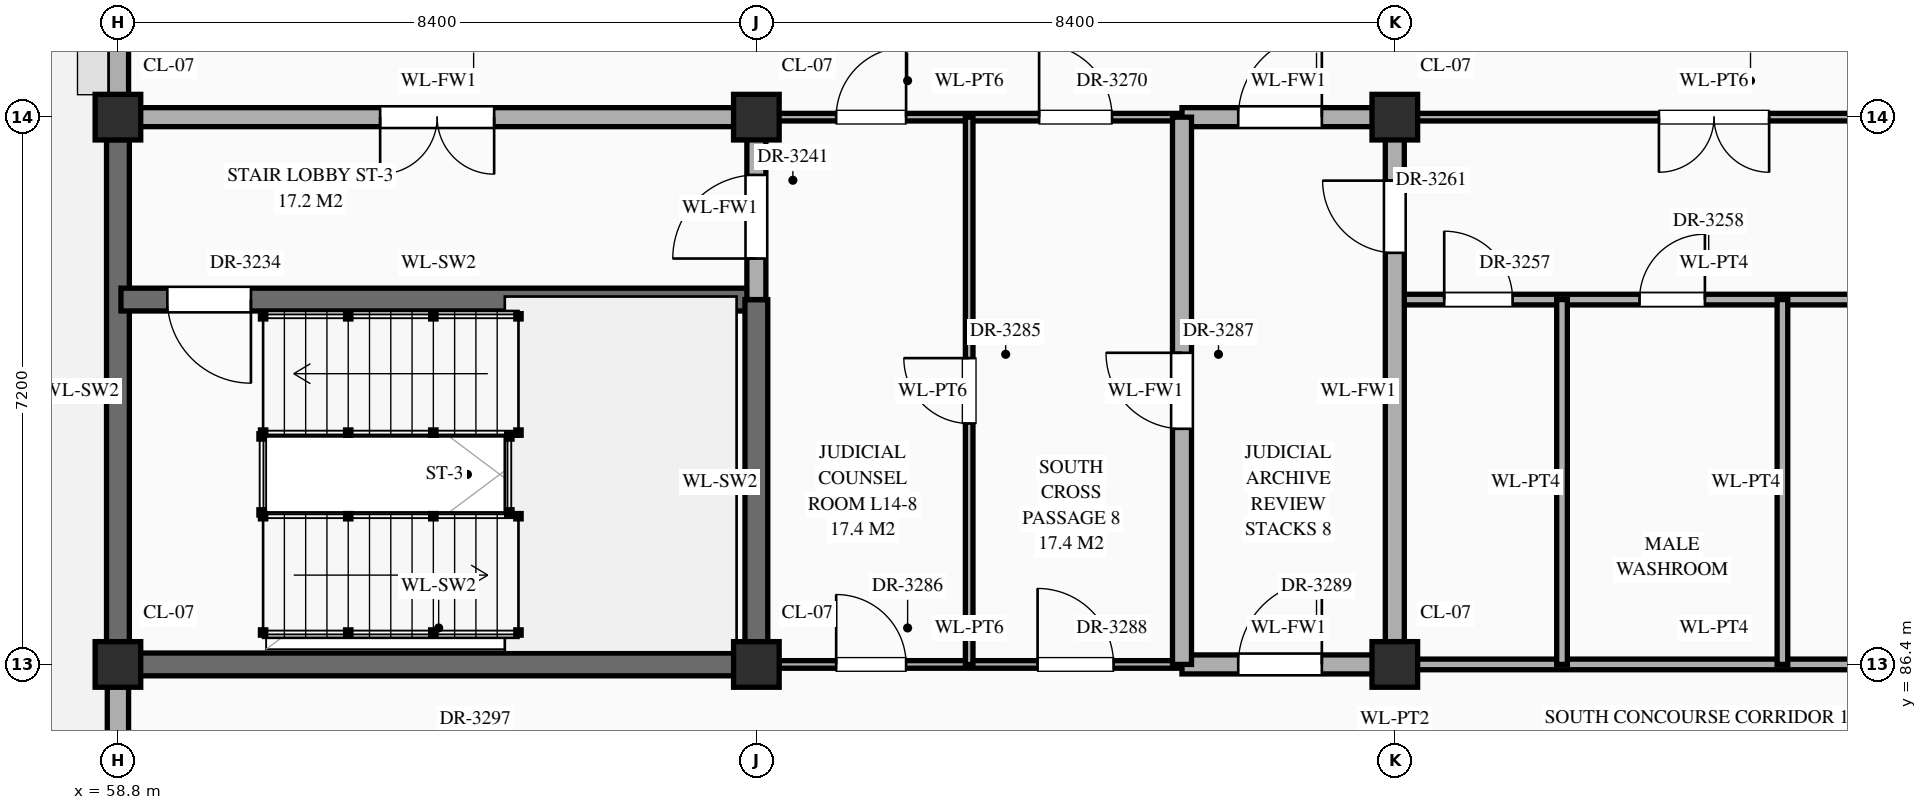
"""IFC4 building model, lengths in metres.
Left out: names, types, materials, properties, quantities, classifications, styles, units other than length and angle.
Written with IfcOpenShell. Run it as: python <this file> out.ifc"""

import sys

from ifc_helpers import new_model, si_unit, direction, frame, frame_2d, origin, origin_2d, place, context, subcontext, project, spatial, rectangle, extrude, element, fill, save


model = new_model("IFC4")
c1 = context("Model", 3, precision=1e-05, world=origin(), true_north=direction((0.0, 1.0)))
c2 = subcontext(c1, "Body", "Model", "MODEL_VIEW")
j1 = project(units=[si_unit("LENGTHUNIT", "METRE"), si_unit("PLANEANGLEUNIT", "RADIAN")], contexts=[c1])
p1 = place(None, origin())
s1 = spatial("IfcSite", under=j1, at=p1, CompositionType="ELEMENT")
p2 = place(p1, origin())
s2 = spatial("IfcBuilding", under=s1, at=p2, CompositionType="ELEMENT")
p3 = place(p2, frame((0.0, 0.0, 60.3)))
s3 = spatial("IfcBuildingStorey", under=s2, at=p3, CompositionType="ELEMENT", Elevation=60.3)
for number, where, z_axis, x_axis in (
    (1, (58.8, 86.4, 0.0), (0.0, 0.0, 1.0), (1.0, 0.0, 0.0)),
    (2, (58.8, 93.6, 0.0), (0.0, 0.0, 1.0), (1.0, 0.0, 0.0)),
    (3, (67.2, 86.4, 0.0), (0.0, 0.0, 1.0), (1.0, 0.0, 0.0)),
    (4, (67.2, 93.6, 0.0), (0.0, 0.0, 1.0), (1.0, 0.0, 0.0)),
    (5, (75.6, 86.4, 0.0), (0.0, 0.0, 1.0), (1.0, 0.0, 0.0)),
    (6, (75.6, 93.6, 0.0), (0.0, 0.0, 1.0), (1.0, 0.0, 0.0)),
):
    element("IfcColumn", number, at=place(p3, frame(where, z_axis=z_axis, x_axis=x_axis)), inside=s3, PredefinedType="COLUMN", context=c2, shape_type="SweptSolid", body=[
        extrude(rectangle(XDim=0.6, YDim=0.6, at=origin_2d()), origin(), (0.0, 0.0, 1.0), 4.2),
    ])
p4 = place(p3, frame((58.8, 79.495, 0.0), z_axis=(0.0, 0.0, 1.0), x_axis=(0.0, 1.0, 0.0)))
e7 = element("IfcWall", 7, at=p4, inside=s3, PredefinedType="STANDARD", context=c2, shape_type="SweptSolid", body=[
    extrude(rectangle(XDim=6.61, YDim=0.28, at=frame_2d((3.305, 0.0))), origin(), (0.0, 0.0, 1.0), 3.31),
])
p5 = place(p4, frame((1.205, 0.0, 0.0)))
e8 = element("IfcOpeningElement", 8, at=p5, cuts=e7, PredefinedType="OPENING", context=c2, shape_type="SweptSolid", body=[
    extrude(rectangle(XDim=1.8, YDim=2.25, at=frame_2d((0.9, 1.125))), frame((0.0, 0.152, 0.0), z_axis=(0.0, -1.0, 0.0), x_axis=(1.0, 0.0, 0.0)), (0.0, 0.0, 1.0), 0.304),
])
p6 = place(p3, frame((58.8, 86.695, 0.0), z_axis=(0.0, 0.0, 1.0), x_axis=(0.0, 1.0, 0.0)))
e9 = element("IfcWall", 9, at=p6, inside=s3, PredefinedType="SHEAR", context=c2, shape_type="SweptSolid", body=[
    extrude(rectangle(XDim=6.61, YDim=0.3, at=frame_2d((3.305, 0.0))), origin(), (0.0, 0.0, 1.0), 3.96),
])
p7 = place(p3, frame((58.8, 93.895, 0.0), z_axis=(0.0, 0.0, 1.0), x_axis=(0.0, 1.0, 0.0)))
e10 = element("IfcWall", 10, at=p7, inside=s3, PredefinedType="STANDARD", context=c2, shape_type="SweptSolid", body=[
    extrude(rectangle(XDim=6.61, YDim=0.28, at=frame_2d((3.305, 0.0))), origin(), (0.0, 0.0, 1.0), 3.31),
])
p8 = place(p7, frame((4.155, 0.0, 0.85)))
e11 = element("IfcOpeningElement", 11, at=p8, cuts=e10, PredefinedType="OPENING", context=c2, shape_type="SweptSolid", body=[
    extrude(rectangle(XDim=0.9, YDim=1.92, at=frame_2d((0.45, 0.96))), frame((0.0, 0.152, 0.0), z_axis=(0.0, -1.0, 0.0), x_axis=(1.0, 0.0, 0.0)), (0.0, 0.0, 1.0), 0.304),
])
p9 = place(p3, frame((58.84, 86.4, 0.0), z_axis=(0.0, 0.0, 1.0), x_axis=(1.0, 0.0, 0.0)))
e12 = element("IfcWall", 12, at=p9, inside=s3, PredefinedType="SHEAR", context=c2, shape_type="SweptSolid", body=[
    extrude(rectangle(XDim=8.36, YDim=0.3, at=frame_2d((4.18, 0.0))), origin(), (0.0, 0.0, 1.0), 3.96),
])
p10 = place(p3, frame((67.2, 86.4, 0.0), z_axis=(0.0, 0.0, 1.0), x_axis=(1.0, 0.0, 0.0)))
e13 = element("IfcWall", 13, at=p10, inside=s3, PredefinedType="STANDARD", context=c2, shape_type="SweptSolid", body=[
    extrude(rectangle(XDim=5.6, YDim=0.1, at=frame_2d((2.8, 0.0))), origin(), (0.0, 0.0, 1.0), 3.11),
])
p11 = place(p10, frame((1.05, 0.0, 0.0)))
e14 = element("IfcOpeningElement", 14, at=p11, cuts=e13, PredefinedType="OPENING", context=c2, shape_type="SweptSolid", body=[
    extrude(rectangle(XDim=0.92, YDim=2.15, at=frame_2d((0.46, 1.075))), frame((0.0, 0.062, 0.0), z_axis=(0.0, -1.0, 0.0), x_axis=(1.0, 0.0, 0.0)), (0.0, 0.0, 1.0), 0.124),
])
p12 = place(p10, frame((3.7, 0.0, 0.0)))
e15 = element("IfcOpeningElement", 15, at=p12, cuts=e13, PredefinedType="OPENING", context=c2, shape_type="SweptSolid", body=[
    extrude(rectangle(XDim=1.0, YDim=2.25, at=frame_2d((0.5, 1.125))), frame((0.0, 0.062, 0.0), z_axis=(0.0, -1.0, 0.0), x_axis=(1.0, 0.0, 0.0)), (0.0, 0.0, 1.0), 0.124),
])
p13 = place(p3, frame((72.8, 86.4, 0.0), z_axis=(0.0, 0.0, 1.0), x_axis=(1.0, 0.0, 0.0)))
e16 = element("IfcWall", 16, at=p13, inside=s3, PredefinedType="STANDARD", context=c2, shape_type="SweptSolid", body=[
    extrude(rectangle(XDim=2.8, YDim=0.25, at=frame_2d((1.4, 0.0))), origin(), (0.0, 0.0, 1.0), 3.11),
])
p14 = place(p13, frame((0.74, 0.0, 0.0)))
e17 = element("IfcOpeningElement", 17, at=p14, cuts=e16, PredefinedType="OPENING", context=c2, shape_type="SweptSolid", body=[
    extrude(rectangle(XDim=1.1, YDim=2.2, at=frame_2d((0.55, 1.1))), frame((0.0, 0.137, 0.0), z_axis=(0.0, -1.0, 0.0), x_axis=(1.0, 0.0, 0.0)), (0.0, 0.0, 1.0), 0.274),
])
p15 = place(p3, frame((75.6, 86.4, 0.0), z_axis=(0.0, 0.0, 1.0), x_axis=(1.0, 0.0, 0.0)))
e18 = element("IfcWall", 18, at=p15, inside=s3, PredefinedType="STANDARD", context=c2, shape_type="SweptSolid", body=[
    extrude(rectangle(XDim=8.4, YDim=0.14, at=frame_2d((4.2, 0.0))), origin(), (0.0, 0.0, 1.0), 3.11),
])
p16 = place(p3, frame((58.84, 91.2, 0.0), z_axis=(0.0, 0.0, 1.0), x_axis=(1.0, 0.0, 0.0)))
e19 = element("IfcWall", 19, at=p16, inside=s3, PredefinedType="SHEAR", context=c2, shape_type="SweptSolid", body=[
    extrude(rectangle(XDim=8.36, YDim=0.3, at=frame_2d((4.18, 0.0))), origin(), (0.0, 0.0, 1.0), 3.96),
])
p17 = place(p16, frame((0.61, 0.0, 0.0)))
e20 = element("IfcOpeningElement", 20, at=p17, cuts=e19, PredefinedType="OPENING", context=c2, shape_type="SweptSolid", body=[
    extrude(rectangle(XDim=1.1, YDim=2.2, at=frame_2d((0.55, 1.1))), frame((0.0, 0.162, 0.0), z_axis=(0.0, -1.0, 0.0), x_axis=(1.0, 0.0, 0.0)), (0.0, 0.0, 1.0), 0.324),
])
p18 = place(p3, frame((75.6, 91.2, 0.0), z_axis=(0.0, 0.0, 1.0), x_axis=(1.0, 0.0, 0.0)))
e21 = element("IfcWall", 21, at=p18, inside=s3, PredefinedType="STANDARD", context=c2, shape_type="SweptSolid", body=[
    extrude(rectangle(XDim=8.4, YDim=0.14, at=frame_2d((4.2, 0.0))), origin(), (0.0, 0.0, 1.0), 3.96),
])
p19 = place(p18, frame((0.65, 0.0, 0.0)))
e22 = element("IfcOpeningElement", 22, at=p19, cuts=e21, PredefinedType="OPENING", context=c2, shape_type="SweptSolid", body=[
    extrude(rectangle(XDim=0.9, YDim=2.15, at=frame_2d((0.45, 1.075))), frame((0.0, 0.082, 0.0), z_axis=(0.0, -1.0, 0.0), x_axis=(1.0, 0.0, 0.0)), (0.0, 0.0, 1.0), 0.164),
])
p20 = place(p18, frame((3.22, 0.0, 0.0)))
e23 = element("IfcOpeningElement", 23, at=p20, cuts=e21, PredefinedType="OPENING", context=c2, shape_type="SweptSolid", body=[
    extrude(rectangle(XDim=0.86, YDim=2.1, at=frame_2d((0.43, 1.05))), frame((0.0, 0.082, 0.0), z_axis=(0.0, -1.0, 0.0), x_axis=(1.0, 0.0, 0.0)), (0.0, 0.0, 1.0), 0.164),
])
p21 = place(p18, frame((6.32, 0.0, 0.0)))
e24 = element("IfcOpeningElement", 24, at=p21, cuts=e21, PredefinedType="OPENING", context=c2, shape_type="SweptSolid", body=[
    extrude(rectangle(XDim=0.86, YDim=2.1, at=frame_2d((0.43, 1.05))), frame((0.0, 0.082, 0.0), z_axis=(0.0, -1.0, 0.0), x_axis=(1.0, 0.0, 0.0)), (0.0, 0.0, 1.0), 0.164),
])
p22 = place(p3, frame((58.84, 93.6, 0.0), z_axis=(0.0, 0.0, 1.0), x_axis=(1.0, 0.0, 0.0)))
e25 = element("IfcWall", 25, at=p22, inside=s3, PredefinedType="STANDARD", context=c2, shape_type="SweptSolid", body=[
    extrude(rectangle(XDim=8.36, YDim=0.25, at=frame_2d((4.18, 0.0))), origin(), (0.0, 0.0, 1.0), 3.11),
])
p23 = place(p22, frame((3.41, 0.0, 0.0)))
e26 = element("IfcOpeningElement", 26, at=p23, cuts=e25, PredefinedType="OPENING", context=c2, shape_type="SweptSolid", body=[
    extrude(rectangle(XDim=1.5, YDim=2.25, at=frame_2d((0.75, 1.125))), frame((0.0, 0.137, 0.0), z_axis=(0.0, -1.0, 0.0), x_axis=(1.0, 0.0, 0.0)), (0.0, 0.0, 1.0), 0.274),
])
p24 = place(p3, frame((67.2, 93.6, 0.0), z_axis=(0.0, 0.0, 1.0), x_axis=(1.0, 0.0, 0.0)))
e27 = element("IfcWall", 27, at=p24, inside=s3, PredefinedType="STANDARD", context=c2, shape_type="SweptSolid", body=[
    extrude(rectangle(XDim=5.6, YDim=0.1, at=frame_2d((2.8, 0.0))), origin(), (0.0, 0.0, 1.0), 3.11),
])
p25 = place(p24, frame((1.05, 0.0, 0.0)))
e28 = element("IfcOpeningElement", 28, at=p25, cuts=e27, PredefinedType="OPENING", context=c2, shape_type="SweptSolid", body=[
    extrude(rectangle(XDim=0.92, YDim=2.15, at=frame_2d((0.46, 1.075))), frame((0.0, 0.062, 0.0), z_axis=(0.0, -1.0, 0.0), x_axis=(1.0, 0.0, 0.0)), (0.0, 0.0, 1.0), 0.124),
])
p26 = place(p24, frame((3.72, 0.0, 0.0)))
e29 = element("IfcOpeningElement", 29, at=p26, cuts=e27, PredefinedType="OPENING", context=c2, shape_type="SweptSolid", body=[
    extrude(rectangle(XDim=0.96, YDim=2.2, at=frame_2d((0.48, 1.1))), frame((0.0, 0.062, 0.0), z_axis=(0.0, -1.0, 0.0), x_axis=(1.0, 0.0, 0.0)), (0.0, 0.0, 1.0), 0.124),
])
p27 = place(p3, frame((72.8, 93.6, 0.0), z_axis=(0.0, 0.0, 1.0), x_axis=(1.0, 0.0, 0.0)))
e30 = element("IfcWall", 30, at=p27, inside=s3, PredefinedType="STANDARD", context=c2, shape_type="SweptSolid", body=[
    extrude(rectangle(XDim=2.8, YDim=0.25, at=frame_2d((1.4, 0.0))), origin(), (0.0, 0.0, 1.0), 3.11),
])
p28 = place(p27, frame((0.74, 0.0, 0.0)))
e31 = element("IfcOpeningElement", 31, at=p28, cuts=e30, PredefinedType="OPENING", context=c2, shape_type="SweptSolid", body=[
    extrude(rectangle(XDim=1.1, YDim=2.2, at=frame_2d((0.55, 1.1))), frame((0.0, 0.137, 0.0), z_axis=(0.0, -1.0, 0.0), x_axis=(1.0, 0.0, 0.0)), (0.0, 0.0, 1.0), 0.274),
])
p29 = place(p3, frame((75.6, 93.6, 0.0), z_axis=(0.0, 0.0, 1.0), x_axis=(1.0, 0.0, 0.0)))
e32 = element("IfcWall", 32, at=p29, inside=s3, PredefinedType="STANDARD", context=c2, shape_type="SweptSolid", body=[
    extrude(rectangle(XDim=8.4, YDim=0.1, at=frame_2d((4.2, 0.0))), origin(), (0.0, 0.0, 1.0), 3.11),
])
p30 = place(p29, frame((3.475, 0.0, 0.0)))
e33 = element("IfcOpeningElement", 33, at=p30, cuts=e32, PredefinedType="OPENING", context=c2, shape_type="SweptSolid", body=[
    extrude(rectangle(XDim=1.45, YDim=2.3, at=frame_2d((0.725, 1.15))), frame((0.0, 0.062, 0.0), z_axis=(0.0, -1.0, 0.0), x_axis=(1.0, 0.0, 0.0)), (0.0, 0.0, 1.0), 0.124),
])
p31 = place(p3, frame((67.2, 86.4, 0.0), z_axis=(0.0, 0.0, 1.0), x_axis=(0.0, 1.0, 0.0)))
e34 = element("IfcWall", 34, at=p31, inside=s3, PredefinedType="SHEAR", context=c2, shape_type="SweptSolid", body=[
    extrude(rectangle(XDim=4.8, YDim=0.3, at=frame_2d((2.4, 0.0))), origin(), (0.0, 0.0, 1.0), 3.96),
])
p32 = place(p3, frame((67.2, 91.2, 0.0), z_axis=(0.0, 0.0, 1.0), x_axis=(0.0, 1.0, 0.0)))
e35 = element("IfcWall", 35, at=p32, inside=s3, PredefinedType="STANDARD", context=c2, shape_type="SweptSolid", body=[
    extrude(rectangle(XDim=2.4, YDim=0.25, at=frame_2d((1.2, 0.0))), origin(), (0.0, 0.0, 1.0), 3.21),
])
p33 = place(p32, frame((0.54, 0.0, 0.0)))
e36 = element("IfcOpeningElement", 36, at=p33, cuts=e35, PredefinedType="OPENING", context=c2, shape_type="SweptSolid", body=[
    extrude(rectangle(XDim=1.1, YDim=2.2, at=frame_2d((0.55, 1.1))), frame((0.0, 0.137, 0.0), z_axis=(0.0, -1.0, 0.0), x_axis=(1.0, 0.0, 0.0)), (0.0, 0.0, 1.0), 0.274),
])
p34 = place(p3, frame((70.0, 86.4, 0.0), z_axis=(0.0, 0.0, 1.0), x_axis=(0.0, 1.0, 0.0)))
e37 = element("IfcWall", 37, at=p34, inside=s3, PredefinedType="STANDARD", context=c2, shape_type="SweptSolid", body=[
    extrude(rectangle(XDim=7.2, YDim=0.1, at=frame_2d((3.6, 0.0))), origin(), (0.0, 0.0, 1.0), 3.96),
])
p35 = place(p34, frame((3.17, 0.0, 0.0)))
e38 = element("IfcOpeningElement", 38, at=p35, cuts=e37, PredefinedType="OPENING", context=c2, shape_type="SweptSolid", body=[
    extrude(rectangle(XDim=0.86, YDim=2.1, at=frame_2d((0.43, 1.05))), frame((0.0, 0.062, 0.0), z_axis=(0.0, -1.0, 0.0), x_axis=(1.0, 0.0, 0.0)), (0.0, 0.0, 1.0), 0.124),
])
p36 = place(p3, frame((72.8, 86.4, 0.0), z_axis=(0.0, 0.0, 1.0), x_axis=(0.0, 1.0, 0.0)))
e39 = element("IfcWall", 39, at=p36, inside=s3, PredefinedType="STANDARD", context=c2, shape_type="SweptSolid", body=[
    extrude(rectangle(XDim=7.2, YDim=0.25, at=frame_2d((3.6, 0.0))), origin(), (0.0, 0.0, 1.0), 3.96),
])
p37 = place(p36, frame((3.1, 0.0, 0.0)))
e40 = element("IfcOpeningElement", 40, at=p37, cuts=e39, PredefinedType="OPENING", context=c2, shape_type="SweptSolid", body=[
    extrude(rectangle(XDim=1.0, YDim=2.2, at=frame_2d((0.5, 1.1))), frame((0.0, 0.137, 0.0), z_axis=(0.0, -1.0, 0.0), x_axis=(1.0, 0.0, 0.0)), (0.0, 0.0, 1.0), 0.274),
])
p38 = place(p3, frame((75.6, 86.4, 0.0), z_axis=(0.0, 0.0, 1.0), x_axis=(0.0, 1.0, 0.0)))
e41 = element("IfcWall", 41, at=p38, inside=s3, PredefinedType="STANDARD", context=c2, shape_type="SweptSolid", body=[
    extrude(rectangle(XDim=7.2, YDim=0.25, at=frame_2d((3.6, 0.0))), origin(), (0.0, 0.0, 1.0), 3.21),
])
p39 = place(p38, frame((5.415, 0.0, 0.0)))
e42 = element("IfcOpeningElement", 42, at=p39, cuts=e41, PredefinedType="OPENING", context=c2, shape_type="SweptSolid", body=[
    extrude(rectangle(XDim=0.95, YDim=2.15, at=frame_2d((0.475, 1.075))), frame((0.0, 0.137, 0.0), z_axis=(0.0, -1.0, 0.0), x_axis=(1.0, 0.0, 0.0)), (0.0, 0.0, 1.0), 0.274),
])
for number, where, z_axis, x_axis in (
    (43, (77.8, 86.4, 0.0), (0.0, 0.0, 1.0), (0.0, 1.0, 0.0)),
    (44, (80.7, 86.4, 0.0), (0.0, 0.0, 1.0), (0.0, 1.0, 0.0)),
):
    element("IfcWall", number, at=place(p3, frame(where, z_axis=z_axis, x_axis=x_axis)), inside=s3, PredefinedType="STANDARD", context=c2, shape_type="SweptSolid", body=[
        extrude(rectangle(XDim=4.8, YDim=0.14, at=frame_2d((2.4, 0.0))), origin(), (0.0, 0.0, 1.0), 3.96),
    ])
p40 = place(p17, frame((1.1, 0.0, 0.0), z_axis=(0.0, 0.0, 1.0), x_axis=(-1.0, 0.0, 0.0)))
e45 = element("IfcDoor", 45, at=p40, inside=s3, OperationType="SINGLE_SWING_LEFT", PredefinedType="DOOR", context=c2, shape_type="SweptSolid", body=[
    extrude(rectangle(XDim=1.1, YDim=2.2, at=frame_2d((0.55, 1.1))), frame((0.0, 0.025, 0.0), z_axis=(0.0, -1.0, 0.0), x_axis=(1.0, 0.0, 0.0)), (0.0, 0.0, 1.0), 0.05),
])
fill(e20, e45)
p41 = place(p23, frame((1.5, 0.0, 0.0), z_axis=(0.0, 0.0, 1.0), x_axis=(-1.0, 0.0, 0.0)))
e46 = element("IfcDoor", 46, at=p41, inside=s3, OperationType="DOUBLE_DOOR_SINGLE_SWING", PredefinedType="DOOR", context=c2, shape_type="SweptSolid", body=[
    extrude(rectangle(XDim=1.5, YDim=2.25, at=frame_2d((0.75, 1.125))), frame((0.0, 0.025, 0.0), z_axis=(0.0, -1.0, 0.0), x_axis=(1.0, 0.0, 0.0)), (0.0, 0.0, 1.0), 0.05),
])
fill(e26, e46)
p42 = place(p33, origin())
e47 = element("IfcDoor", 47, at=p42, inside=s3, OperationType="SINGLE_SWING_LEFT", PredefinedType="DOOR", context=c2, shape_type="SweptSolid", body=[
    extrude(rectangle(XDim=1.1, YDim=2.2, at=frame_2d((0.55, 1.1))), frame((0.0, 0.025, 0.0), z_axis=(0.0, -1.0, 0.0), x_axis=(1.0, 0.0, 0.0)), (0.0, 0.0, 1.0), 0.05),
])
fill(e36, e47)
p43 = place(p19, origin())
e48 = element("IfcDoor", 48, at=p43, inside=s3, OperationType="SINGLE_SWING_LEFT", PredefinedType="DOOR", context=c2, shape_type="SweptSolid", body=[
    extrude(rectangle(XDim=0.9, YDim=2.15, at=frame_2d((0.45, 1.075))), frame((0.0, 0.025, 0.0), z_axis=(0.0, -1.0, 0.0), x_axis=(1.0, 0.0, 0.0)), (0.0, 0.0, 1.0), 0.05),
])
fill(e22, e48)
p44 = place(p20, origin())
e49 = element("IfcDoor", 49, at=p44, inside=s3, OperationType="SINGLE_SWING_RIGHT", PredefinedType="DOOR", context=c2, shape_type="SweptSolid", body=[
    extrude(rectangle(XDim=0.86, YDim=2.1, at=frame_2d((0.43, 1.05))), frame((0.0, 0.025, 0.0), z_axis=(0.0, -1.0, 0.0), x_axis=(1.0, 0.0, 0.0)), (0.0, 0.0, 1.0), 0.05),
])
fill(e23, e49)
p45 = place(p30, frame((1.45, 0.0, 0.0), z_axis=(0.0, 0.0, 1.0), x_axis=(-1.0, 0.0, 0.0)))
e50 = element("IfcDoor", 50, at=p45, inside=s3, OperationType="DOUBLE_DOOR_SINGLE_SWING", PredefinedType="DOOR", context=c2, shape_type="SweptSolid", body=[
    extrude(rectangle(XDim=1.45, YDim=2.3, at=frame_2d((0.725, 1.15))), frame((0.0, 0.025, 0.0), z_axis=(0.0, -1.0, 0.0), x_axis=(1.0, 0.0, 0.0)), (0.0, 0.0, 1.0), 0.05),
])
fill(e33, e50)
p46 = place(p39, origin())
e51 = element("IfcDoor", 51, at=p46, inside=s3, OperationType="SINGLE_SWING_RIGHT", PredefinedType="DOOR", context=c2, shape_type="SweptSolid", body=[
    extrude(rectangle(XDim=0.95, YDim=2.15, at=frame_2d((0.475, 1.075))), frame((0.0, 0.025, 0.0), z_axis=(0.0, -1.0, 0.0), x_axis=(1.0, 0.0, 0.0)), (0.0, 0.0, 1.0), 0.05),
])
fill(e42, e51)
p47 = place(p25, origin())
e52 = element("IfcDoor", 52, at=p47, inside=s3, OperationType="SINGLE_SWING_RIGHT", PredefinedType="DOOR", context=c2, shape_type="SweptSolid", body=[
    extrude(rectangle(XDim=0.92, YDim=2.15, at=frame_2d((0.46, 1.075))), frame((0.0, 0.025, 0.0), z_axis=(0.0, -1.0, 0.0), x_axis=(1.0, 0.0, 0.0)), (0.0, 0.0, 1.0), 0.05),
])
fill(e28, e52)
p48 = place(p26, origin())
e53 = element("IfcDoor", 53, at=p48, inside=s3, OperationType="SINGLE_SWING_LEFT", PredefinedType="DOOR", context=c2, shape_type="SweptSolid", body=[
    extrude(rectangle(XDim=0.96, YDim=2.2, at=frame_2d((0.48, 1.1))), frame((0.0, 0.025, 0.0), z_axis=(0.0, -1.0, 0.0), x_axis=(1.0, 0.0, 0.0)), (0.0, 0.0, 1.0), 0.05),
])
fill(e29, e53)
p49 = place(p28, origin())
e54 = element("IfcDoor", 54, at=p49, inside=s3, OperationType="SINGLE_SWING_RIGHT", PredefinedType="DOOR", context=c2, shape_type="SweptSolid", body=[
    extrude(rectangle(XDim=1.1, YDim=2.2, at=frame_2d((0.55, 1.1))), frame((0.0, 0.025, 0.0), z_axis=(0.0, -1.0, 0.0), x_axis=(1.0, 0.0, 0.0)), (0.0, 0.0, 1.0), 0.05),
])
fill(e31, e54)
p50 = place(p35, origin())
e55 = element("IfcDoor", 55, at=p50, inside=s3, OperationType="SINGLE_SWING_RIGHT", PredefinedType="DOOR", context=c2, shape_type="SweptSolid", body=[
    extrude(rectangle(XDim=0.86, YDim=2.1, at=frame_2d((0.43, 1.05))), frame((0.0, 0.025, 0.0), z_axis=(0.0, -1.0, 0.0), x_axis=(1.0, 0.0, 0.0)), (0.0, 0.0, 1.0), 0.05),
])
fill(e38, e55)
p51 = place(p11, origin())
e56 = element("IfcDoor", 56, at=p51, inside=s3, OperationType="SINGLE_SWING_LEFT", PredefinedType="DOOR", context=c2, shape_type="SweptSolid", body=[
    extrude(rectangle(XDim=0.92, YDim=2.15, at=frame_2d((0.46, 1.075))), frame((0.0, 0.025, 0.0), z_axis=(0.0, -1.0, 0.0), x_axis=(1.0, 0.0, 0.0)), (0.0, 0.0, 1.0), 0.05),
])
fill(e14, e56)
p52 = place(p37, origin())
e57 = element("IfcDoor", 57, at=p52, inside=s3, OperationType="SINGLE_SWING_RIGHT", PredefinedType="DOOR", context=c2, shape_type="SweptSolid", body=[
    extrude(rectangle(XDim=1.0, YDim=2.2, at=frame_2d((0.5, 1.1))), frame((0.0, 0.025, 0.0), z_axis=(0.0, -1.0, 0.0), x_axis=(1.0, 0.0, 0.0)), (0.0, 0.0, 1.0), 0.05),
])
fill(e40, e57)
p53 = place(p12, origin())
e58 = element("IfcDoor", 58, at=p53, inside=s3, OperationType="SINGLE_SWING_LEFT", PredefinedType="DOOR", context=c2, shape_type="SweptSolid", body=[
    extrude(rectangle(XDim=1.0, YDim=2.25, at=frame_2d((0.5, 1.125))), frame((0.0, 0.025, 0.0), z_axis=(0.0, -1.0, 0.0), x_axis=(1.0, 0.0, 0.0)), (0.0, 0.0, 1.0), 0.05),
])
fill(e15, e58)
p54 = place(p14, origin())
e59 = element("IfcDoor", 59, at=p54, inside=s3, OperationType="SINGLE_SWING_RIGHT", PredefinedType="DOOR", context=c2, shape_type="SweptSolid", body=[
    extrude(rectangle(XDim=1.1, YDim=2.2, at=frame_2d((0.55, 1.1))), frame((0.0, 0.025, 0.0), z_axis=(0.0, -1.0, 0.0), x_axis=(1.0, 0.0, 0.0)), (0.0, 0.0, 1.0), 0.05),
])
fill(e17, e59)
save(model, sys.argv[1])
